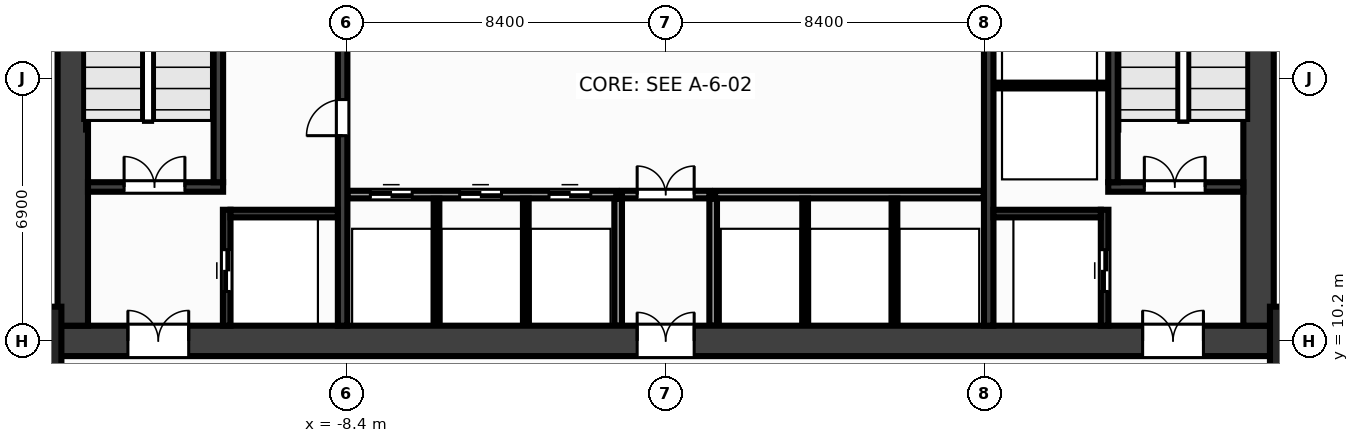
"""IFC4 building model, lengths in metres.
Left out: names, types, materials, properties, quantities, classifications, styles, units other than length and angle.
Written with IfcOpenShell. Run it as: python <this file> out.ifc"""

import sys

from ifc_helpers import new_model, si_unit, direction, frame, frame_2d, origin, origin_2d, place, context, subcontext, project, spatial, rectangle, extrude, source, transform, mapped, element, fill, save


model = new_model("IFC4")
c1 = context("Model", 3, precision=1e-05, world=origin(), true_north=direction((0.0, 1.0)))
c2 = subcontext(c1, "Body", "Model", "MODEL_VIEW")
j1 = project(units=[si_unit("LENGTHUNIT", "METRE"), si_unit("PLANEANGLEUNIT", "RADIAN")], contexts=[c1])
p1 = place(None, origin())
s1 = spatial("IfcSite", under=j1, at=p1, CompositionType="ELEMENT")
p2 = place(p1, origin())
s2 = spatial("IfcBuilding", under=s1, at=p2, CompositionType="ELEMENT")
p3 = place(p2, frame((0.0, 0.0, 18.95)))
s3 = spatial("IfcBuildingStorey", under=s2, at=p3, CompositionType="ELEMENT", Elevation=18.95)
m1 = source(origin(), c2, "Body", "SweptSolid", [
    extrude(rectangle(XDim=32.0, YDim=0.8, at=frame_2d((16.0, 0.0))), origin(), (0.0, 0.0, 1.0), 4.65),
])
p4 = place(p3, frame((-16.0, 10.2, 0.0), z_axis=(0.0, 0.0, 1.0), x_axis=(1.0, 0.0, 0.0)))
e1 = element("IfcWall", 1, at=p4, inside=s3, PredefinedType="SHEAR", context=c2, shape_type="MappedRepresentation", body=[
    mapped(m1, transform((0.0, 0.0, 0.0), x_axis=(1.0, 0.0, 0.0), y_axis=(0.0, 1.0, 0.0), z_axis=(0.0, 0.0, 1.0), scale=1.0)),
])
p5 = place(p4, frame((1.85, 0.0, 0.0)))
e2 = element("IfcOpeningElement", 2, at=p5, cuts=e1, PredefinedType="OPENING", context=c2, shape_type="SweptSolid", body=[
    extrude(rectangle(XDim=1.6, YDim=2.15, at=frame_2d((0.8, 1.075))), frame((0.0, 0.412, 0.0), z_axis=(0.0, -1.0, 0.0), x_axis=(1.0, 0.0, 0.0)), (0.0, 0.0, 1.0), 0.824),
])
p6 = place(p4, frame((28.55, 0.0, 0.0)))
e3 = element("IfcOpeningElement", 3, at=p6, cuts=e1, PredefinedType="OPENING", context=c2, shape_type="SweptSolid", body=[
    extrude(rectangle(XDim=1.6, YDim=2.15, at=frame_2d((0.8, 1.075))), frame((0.0, 0.412, 0.0), z_axis=(0.0, -1.0, 0.0), x_axis=(1.0, 0.0, 0.0)), (0.0, 0.0, 1.0), 0.824),
])
p7 = place(p4, frame((15.25, 0.0, 0.0)))
e4 = element("IfcOpeningElement", 4, at=p7, cuts=e1, PredefinedType="OPENING", context=c2, shape_type="SweptSolid", body=[
    extrude(rectangle(XDim=1.5, YDim=2.2, at=frame_2d((0.75, 1.1))), frame((0.0, 0.412, 0.0), z_axis=(0.0, -1.0, 0.0), x_axis=(1.0, 0.0, 0.0)), (0.0, 0.0, 1.0), 0.824),
])
m2 = source(origin(), c2, "Body", "SweptSolid", [
    extrude(rectangle(XDim=12.8, YDim=0.8, at=frame_2d((6.4, 0.0))), origin(), (0.0, 0.0, 1.0), 4.65),
])
for number, where, z_axis, x_axis in (
    (5, (-15.6, 10.6, 0.0), (0.0, 0.0, 1.0), (0.0, 1.0, 0.0)),
    (6, (15.6, 10.6, 0.0), (0.0, 0.0, 1.0), (0.0, 1.0, 0.0)),
):
    element("IfcWall", number, at=place(p3, frame(where, z_axis=z_axis, x_axis=x_axis)), inside=s3, PredefinedType="SHEAR", context=c2, shape_type="MappedRepresentation", body=[
        mapped(m2, transform((0.0, 0.0, 0.0), x_axis=(1.0, 0.0, 0.0), y_axis=(0.0, 1.0, 0.0), z_axis=(0.0, 0.0, 1.0), scale=1.0)),
    ])
m3 = source(origin(), c2, "Body", "SweptSolid", [
    extrude(rectangle(XDim=12.8, YDim=0.25, at=frame_2d((6.4, 0.0))), origin(), (0.0, 0.0, 1.0), 4.65),
])
p8 = place(p3, frame((-8.5, 10.6, 0.0), z_axis=(0.0, 0.0, 1.0), x_axis=(0.0, 1.0, 0.0)))
e7 = element("IfcWall", 7, at=p8, inside=s3, PredefinedType="SHEAR", context=c2, shape_type="MappedRepresentation", body=[
    mapped(m3, transform((0.0, 0.0, 0.0), x_axis=(1.0, 0.0, 0.0), y_axis=(0.0, 1.0, 0.0), z_axis=(0.0, 0.0, 1.0), scale=1.0)),
])
p9 = place(p8, frame((5.0, 0.0, 0.0)))
e8 = element("IfcOpeningElement", 8, at=p9, cuts=e7, PredefinedType="OPENING", context=c2, shape_type="SweptSolid", body=[
    extrude(rectangle(XDim=0.95, YDim=2.15, at=frame_2d((0.475, 1.075))), frame((0.0, 0.137, 0.0), z_axis=(0.0, -1.0, 0.0), x_axis=(1.0, 0.0, 0.0)), (0.0, 0.0, 1.0), 0.274),
])
p10 = place(p8, frame((8.1, 0.0, 0.0)))
e9 = element("IfcOpeningElement", 9, at=p10, cuts=e7, PredefinedType="OPENING", context=c2, shape_type="SweptSolid", body=[
    extrude(rectangle(XDim=0.95, YDim=2.15, at=frame_2d((0.475, 1.075))), frame((0.0, 0.137, 0.0), z_axis=(0.0, -1.0, 0.0), x_axis=(1.0, 0.0, 0.0)), (0.0, 0.0, 1.0), 0.274),
])
p11 = place(p3, frame((8.5, 10.6, 0.0), z_axis=(0.0, 0.0, 1.0), x_axis=(0.0, 1.0, 0.0)))
e10 = element("IfcWall", 10, at=p11, inside=s3, PredefinedType="SHEAR", context=c2, shape_type="MappedRepresentation", body=[
    mapped(m3, transform((0.0, 0.0, 0.0), x_axis=(1.0, 0.0, 0.0), y_axis=(0.0, 1.0, 0.0), z_axis=(0.0, 0.0, 1.0), scale=1.0)),
])
p12 = place(p11, frame((9.85, 0.0, 0.0)))
e11 = element("IfcOpeningElement", 11, at=p12, cuts=e10, PredefinedType="OPENING", context=c2, shape_type="SweptSolid", body=[
    extrude(rectangle(XDim=0.95, YDim=2.15, at=frame_2d((0.475, 1.075))), frame((0.0, 0.137, 0.0), z_axis=(0.0, -1.0, 0.0), x_axis=(1.0, 0.0, 0.0)), (0.0, 0.0, 1.0), 0.274),
])
m4 = source(origin(), c2, "Body", "SweptSolid", [
    extrude(rectangle(XDim=3.555, YDim=0.25, at=frame_2d((1.777, 0.0))), origin(), (0.0, 0.0, 1.0), 4.65),
])
p13 = place(p3, frame((-15.2, 14.25, 0.0), z_axis=(0.0, 0.0, 1.0), x_axis=(1.0, 0.0, 0.0)))
e12 = element("IfcWall", 12, at=p13, inside=s3, PredefinedType="SHEAR", context=c2, shape_type="MappedRepresentation", body=[
    mapped(m4, transform((0.0, 0.0, 0.0), x_axis=(1.0, 0.0, 0.0), y_axis=(0.0, 1.0, 0.0), z_axis=(0.0, 0.0, 1.0), scale=1.0)),
])
p14 = place(p13, frame((0.95, 0.0, 0.0)))
e13 = element("IfcOpeningElement", 13, at=p14, cuts=e12, PredefinedType="OPENING", context=c2, shape_type="SweptSolid", body=[
    extrude(rectangle(XDim=1.6, YDim=2.15, at=frame_2d((0.8, 1.075))), frame((0.0, 0.137, 0.0), z_axis=(0.0, -1.0, 0.0), x_axis=(1.0, 0.0, 0.0)), (0.0, 0.0, 1.0), 0.274),
])
m5 = source(origin(), c2, "Body", "SweptSolid", [
    extrude(rectangle(XDim=9.025, YDim=0.25, at=frame_2d((4.512, 0.0))), origin(), (0.0, 0.0, 1.0), 4.65),
])
p15 = place(p3, frame((-11.77, 14.375, 0.0), z_axis=(0.0, 0.0, 1.0), x_axis=(0.0, 1.0, 0.0)))
e14 = element("IfcWall", 14, at=p15, inside=s3, PredefinedType="SHEAR", context=c2, shape_type="MappedRepresentation", body=[
    mapped(m5, transform((0.0, 0.0, 0.0), x_axis=(1.0, 0.0, 0.0), y_axis=(0.0, 1.0, 0.0), z_axis=(0.0, 0.0, 1.0), scale=1.0)),
])
p16 = place(p3, frame((11.645, 14.25, 0.0), z_axis=(0.0, 0.0, 1.0), x_axis=(1.0, 0.0, 0.0)))
e15 = element("IfcWall", 15, at=p16, inside=s3, PredefinedType="SHEAR", context=c2, shape_type="MappedRepresentation", body=[
    mapped(m4, transform((0.0, 0.0, 0.0), x_axis=(1.0, 0.0, 0.0), y_axis=(0.0, 1.0, 0.0), z_axis=(0.0, 0.0, 1.0), scale=1.0)),
])
p17 = place(p16, frame((0.95, 0.0, 0.0)))
e16 = element("IfcOpeningElement", 16, at=p17, cuts=e15, PredefinedType="OPENING", context=c2, shape_type="SweptSolid", body=[
    extrude(rectangle(XDim=1.6, YDim=2.15, at=frame_2d((0.8, 1.075))), frame((0.0, 0.137, 0.0), z_axis=(0.0, -1.0, 0.0), x_axis=(1.0, 0.0, 0.0)), (0.0, 0.0, 1.0), 0.274),
])
p18 = place(p3, frame((11.77, 14.375, 0.0), z_axis=(0.0, 0.0, 1.0), x_axis=(0.0, 1.0, 0.0)))
e17 = element("IfcWall", 17, at=p18, inside=s3, PredefinedType="SHEAR", context=c2, shape_type="MappedRepresentation", body=[
    mapped(m5, transform((0.0, 0.0, 0.0), x_axis=(1.0, 0.0, 0.0), y_axis=(0.0, 1.0, 0.0), z_axis=(0.0, 0.0, 1.0), scale=1.0)),
])
m6 = source(origin(), c2, "Body", "SweptSolid", [
    extrude(rectangle(XDim=3.05, YDim=0.2, at=frame_2d((1.525, 0.0))), origin(), (0.0, 0.0, 1.0), 4.65),
])
p19 = place(p3, frame((-11.55, 10.6, 0.0), z_axis=(0.0, 0.0, 1.0), x_axis=(0.0, 1.0, 0.0)))
e18 = element("IfcWall", 18, at=p19, inside=s3, PredefinedType="SHEAR", context=c2, shape_type="MappedRepresentation", body=[
    mapped(m6, transform((0.0, 0.0, 0.0), x_axis=(1.0, 0.0, 0.0), y_axis=(0.0, 1.0, 0.0), z_axis=(0.0, 0.0, 1.0), scale=1.0)),
])
p20 = place(p19, frame((0.9, 0.0, 0.0)))
e19 = element("IfcOpeningElement", 19, at=p20, cuts=e18, PredefinedType="OPENING", context=c2, shape_type="SweptSolid", body=[
    extrude(rectangle(XDim=1.1, YDim=2.15, at=frame_2d((0.55, 1.075))), frame((0.0, 0.112, 0.0), z_axis=(0.0, -1.0, 0.0), x_axis=(1.0, 0.0, 0.0)), (0.0, 0.0, 1.0), 0.224),
])
m7 = source(origin(), c2, "Body", "SweptSolid", [
    extrude(rectangle(XDim=2.825, YDim=0.2, at=frame_2d((1.413, 0.0))), origin(), (0.0, 0.0, 1.0), 4.65),
])
p21 = place(p3, frame((-11.45, 13.55, 0.0), z_axis=(0.0, 0.0, 1.0), x_axis=(1.0, 0.0, 0.0)))
e20 = element("IfcWall", 20, at=p21, inside=s3, PredefinedType="SHEAR", context=c2, shape_type="MappedRepresentation", body=[
    mapped(m7, transform((0.0, 0.0, 0.0), x_axis=(1.0, 0.0, 0.0), y_axis=(0.0, 1.0, 0.0), z_axis=(0.0, 0.0, 1.0), scale=1.0)),
])
p22 = place(p3, frame((11.55, 10.6, 0.0), z_axis=(0.0, 0.0, 1.0), x_axis=(0.0, 1.0, 0.0)))
e21 = element("IfcWall", 21, at=p22, inside=s3, PredefinedType="SHEAR", context=c2, shape_type="MappedRepresentation", body=[
    mapped(m6, transform((0.0, 0.0, 0.0), x_axis=(1.0, 0.0, 0.0), y_axis=(0.0, 1.0, 0.0), z_axis=(0.0, 0.0, 1.0), scale=1.0)),
])
p23 = place(p22, frame((0.9, 0.0, 0.0)))
e22 = element("IfcOpeningElement", 22, at=p23, cuts=e21, PredefinedType="OPENING", context=c2, shape_type="SweptSolid", body=[
    extrude(rectangle(XDim=1.1, YDim=2.15, at=frame_2d((0.55, 1.075))), frame((0.0, 0.112, 0.0), z_axis=(0.0, -1.0, 0.0), x_axis=(1.0, 0.0, 0.0)), (0.0, 0.0, 1.0), 0.224),
])
p24 = place(p3, frame((8.625, 13.55, 0.0), z_axis=(0.0, 0.0, 1.0), x_axis=(1.0, 0.0, 0.0)))
e23 = element("IfcWall", 23, at=p24, inside=s3, PredefinedType="SHEAR", context=c2, shape_type="MappedRepresentation", body=[
    mapped(m7, transform((0.0, 0.0, 0.0), x_axis=(1.0, 0.0, 0.0), y_axis=(0.0, 1.0, 0.0), z_axis=(0.0, 0.0, 1.0), scale=1.0)),
])
m8 = source(origin(), c2, "Body", "SweptSolid", [
    extrude(rectangle(XDim=1.8, YDim=1.8, at=origin_2d()), origin(), (0.0, 0.0, 1.0), 4.65),
])
for number, where, z_axis, x_axis in (
    (24, (-16.8, 10.2, 0.0), (0.0, 0.0, 1.0), (1.0, 0.0, 0.0)),
    (25, (16.8, 10.2, 0.0), (0.0, 0.0, 1.0), (1.0, 0.0, 0.0)),
):
    element("IfcColumn", number, at=place(p3, frame(where, z_axis=z_axis, x_axis=x_axis)), inside=s3, PredefinedType="COLUMN", context=c2, shape_type="MappedRepresentation", body=[
        mapped(m8, transform((0.0, 0.0, 0.0), x_axis=(1.0, 0.0, 0.0), y_axis=(0.0, 1.0, 0.0), z_axis=(0.0, 0.0, 1.0), scale=1.0)),
    ])
m9 = source(origin(), c2, "Body", "SweptSolid", [
    extrude(rectangle(XDim=3.01, YDim=0.15, at=frame_2d((1.505, 0.0))), origin(), (0.0, 0.0, 1.0), 4.41),
])
p25 = place(p3, frame((8.63, 16.92, 0.0), z_axis=(0.0, 0.0, 1.0), x_axis=(1.0, 0.0, 0.0)))
e26 = element("IfcWall", 26, at=p25, inside=s3, PredefinedType="PARTITIONING", context=c2, shape_type="MappedRepresentation", body=[
    mapped(m9, transform((0.0, 0.0, 0.0), x_axis=(1.0, 0.0, 0.0), y_axis=(0.0, 1.0, 0.0), z_axis=(0.0, 0.0, 1.0), scale=1.0)),
])
m10 = source(origin(), c2, "Body", "SweptSolid", [
    extrude(rectangle(XDim=7.07, YDim=0.2, at=frame_2d((3.535, 0.0))), origin(), (0.0, 0.0, 1.0), 4.41),
])
p26 = place(p3, frame((-8.37, 14.05, 0.0), z_axis=(0.0, 0.0, 1.0), x_axis=(1.0, 0.0, 0.0)))
e27 = element("IfcWall", 27, at=p26, inside=s3, PredefinedType="PARTITIONING", context=c2, shape_type="MappedRepresentation", body=[
    mapped(m10, transform((0.0, 0.0, 0.0), x_axis=(1.0, 0.0, 0.0), y_axis=(0.0, 1.0, 0.0), z_axis=(0.0, 0.0, 1.0), scale=1.0)),
])
p27 = place(p26, frame((0.6, 0.0, 0.0)))
e28 = element("IfcOpeningElement", 28, at=p27, cuts=e27, PredefinedType="OPENING", context=c2, shape_type="SweptSolid", body=[
    extrude(rectangle(XDim=1.1, YDim=2.15, at=frame_2d((0.55, 1.075))), frame((0.0, 0.112, 0.0), z_axis=(0.0, -1.0, 0.0), x_axis=(1.0, 0.0, 0.0)), (0.0, 0.0, 1.0), 0.224),
])
p28 = place(p26, frame((2.95, 0.0, 0.0)))
e29 = element("IfcOpeningElement", 29, at=p28, cuts=e27, PredefinedType="OPENING", context=c2, shape_type="SweptSolid", body=[
    extrude(rectangle(XDim=1.1, YDim=2.15, at=frame_2d((0.55, 1.075))), frame((0.0, 0.112, 0.0), z_axis=(0.0, -1.0, 0.0), x_axis=(1.0, 0.0, 0.0)), (0.0, 0.0, 1.0), 0.224),
])
p29 = place(p26, frame((5.3, 0.0, 0.0)))
e30 = element("IfcOpeningElement", 30, at=p29, cuts=e27, PredefinedType="OPENING", context=c2, shape_type="SweptSolid", body=[
    extrude(rectangle(XDim=1.1, YDim=2.15, at=frame_2d((0.55, 1.075))), frame((0.0, 0.112, 0.0), z_axis=(0.0, -1.0, 0.0), x_axis=(1.0, 0.0, 0.0)), (0.0, 0.0, 1.0), 0.224),
])
p30 = place(p3, frame((1.3, 14.05, 0.0), z_axis=(0.0, 0.0, 1.0), x_axis=(1.0, 0.0, 0.0)))
e31 = element("IfcWall", 31, at=p30, inside=s3, PredefinedType="PARTITIONING", context=c2, shape_type="MappedRepresentation", body=[
    mapped(m10, transform((0.0, 0.0, 0.0), x_axis=(1.0, 0.0, 0.0), y_axis=(0.0, 1.0, 0.0), z_axis=(0.0, 0.0, 1.0), scale=1.0)),
])
m11 = source(origin(), c2, "Body", "SweptSolid", [
    extrude(rectangle(XDim=3.34, YDim=0.2, at=frame_2d((1.67, 0.0))), origin(), (0.0, 0.0, 1.0), 4.41),
])
for number, where, z_axis, x_axis in (
    (32, (-1.25, 10.6, 0.0), (0.0, 0.0, 1.0), (0.0, 1.0, 0.0)),
    (33, (1.25, 10.6, 0.0), (0.0, 0.0, 1.0), (0.0, 1.0, 0.0)),
):
    element("IfcWall", number, at=place(p3, frame(where, z_axis=z_axis, x_axis=x_axis)), inside=s3, PredefinedType="PARTITIONING", context=c2, shape_type="MappedRepresentation", body=[
        mapped(m11, transform((0.0, 0.0, 0.0), x_axis=(1.0, 0.0, 0.0), y_axis=(0.0, 1.0, 0.0), z_axis=(0.0, 0.0, 1.0), scale=1.0)),
    ])
m12 = source(origin(), c2, "Body", "SweptSolid", [
    extrude(rectangle(XDim=2.3, YDim=0.2, at=frame_2d((1.15, 0.0))), origin(), (0.0, 0.0, 1.0), 4.41),
])
p31 = place(p3, frame((-1.15, 14.05, 0.0), z_axis=(0.0, 0.0, 1.0), x_axis=(1.0, 0.0, 0.0)))
e34 = element("IfcWall", 34, at=p31, inside=s3, PredefinedType="PARTITIONING", context=c2, shape_type="MappedRepresentation", body=[
    mapped(m12, transform((0.0, 0.0, 0.0), x_axis=(1.0, 0.0, 0.0), y_axis=(0.0, 1.0, 0.0), z_axis=(0.0, 0.0, 1.0), scale=1.0)),
])
p32 = place(p31, frame((0.4, 0.0, 0.0)))
e35 = element("IfcOpeningElement", 35, at=p32, cuts=e34, PredefinedType="OPENING", context=c2, shape_type="SweptSolid", body=[
    extrude(rectangle(XDim=1.5, YDim=2.2, at=frame_2d((0.75, 1.1))), frame((0.0, 0.112, 0.0), z_axis=(0.0, -1.0, 0.0), x_axis=(1.0, 0.0, 0.0)), (0.0, 0.0, 1.0), 0.224),
])
m13 = source(origin(), c2, "Body", "SweptSolid", [
    extrude(rectangle(XDim=3.34, YDim=0.15, at=frame_2d((1.67, 0.0))), origin(), (0.0, 0.0, 1.0), 4.41),
])
for number, where, z_axis, x_axis in (
    (36, (-6.03, 10.6, 0.0), (0.0, 0.0, 1.0), (0.0, 1.0, 0.0)),
    (37, (-3.68, 10.6, 0.0), (0.0, 0.0, 1.0), (0.0, 1.0, 0.0)),
    (38, (3.67, 10.6, 0.0), (0.0, 0.0, 1.0), (0.0, 1.0, 0.0)),
    (39, (6.02, 10.6, 0.0), (0.0, 0.0, 1.0), (0.0, 1.0, 0.0)),
):
    element("IfcWall", number, at=place(p3, frame(where, z_axis=z_axis, x_axis=x_axis)), inside=s3, PredefinedType="PARTITIONING", context=c2, shape_type="MappedRepresentation", body=[
        mapped(m13, transform((0.0, 0.0, 0.0), x_axis=(1.0, 0.0, 0.0), y_axis=(0.0, 1.0, 0.0), z_axis=(0.0, 0.0, 1.0), scale=1.0)),
    ])
m14 = source(origin(), c2, "Body", "SweptSolid", [
    extrude(rectangle(XDim=1.6, YDim=2.15, at=frame_2d((0.8, 1.075))), frame((0.0, 0.025, 0.0), z_axis=(0.0, -1.0, 0.0), x_axis=(1.0, 0.0, 0.0)), (0.0, 0.0, 1.0), 0.05),
])
p33 = place(p14, origin())
e40 = element("IfcDoor", 40, at=p33, inside=s3, OperationType="DOUBLE_DOOR_SINGLE_SWING", PredefinedType="DOOR", context=c2, shape_type="MappedRepresentation", body=[
    mapped(m14, transform((0.0, 0.0, 0.0), x_axis=(1.0, 0.0, 0.0), y_axis=(0.0, 1.0, 0.0), z_axis=(0.0, 0.0, 1.0), scale=1.0)),
])
fill(e13, e40)
p34 = place(p17, origin())
e41 = element("IfcDoor", 41, at=p34, inside=s3, OperationType="DOUBLE_DOOR_SINGLE_SWING", PredefinedType="DOOR", context=c2, shape_type="MappedRepresentation", body=[
    mapped(m14, transform((0.0, 0.0, 0.0), x_axis=(1.0, 0.0, 0.0), y_axis=(0.0, 1.0, 0.0), z_axis=(0.0, 0.0, 1.0), scale=1.0)),
])
fill(e16, e41)
p35 = place(p5, origin())
e42 = element("IfcDoor", 42, at=p35, inside=s3, OperationType="DOUBLE_DOOR_SINGLE_SWING", PredefinedType="DOOR", context=c2, shape_type="MappedRepresentation", body=[
    mapped(m14, transform((0.0, 0.0, 0.0), x_axis=(1.0, 0.0, 0.0), y_axis=(0.0, 1.0, 0.0), z_axis=(0.0, 0.0, 1.0), scale=1.0)),
])
fill(e2, e42)
p36 = place(p6, origin())
e43 = element("IfcDoor", 43, at=p36, inside=s3, OperationType="DOUBLE_DOOR_SINGLE_SWING", PredefinedType="DOOR", context=c2, shape_type="MappedRepresentation", body=[
    mapped(m14, transform((0.0, 0.0, 0.0), x_axis=(1.0, 0.0, 0.0), y_axis=(0.0, 1.0, 0.0), z_axis=(0.0, 0.0, 1.0), scale=1.0)),
])
fill(e3, e43)
m15 = source(origin(), c2, "Body", "SweptSolid", [
    extrude(rectangle(XDim=1.1, YDim=2.15, at=frame_2d((0.55, 1.075))), frame((0.0, 0.025, 0.0), z_axis=(0.0, -1.0, 0.0), x_axis=(1.0, 0.0, 0.0)), (0.0, 0.0, 1.0), 0.05),
])
p37 = place(p20, origin())
e44 = element("IfcDoor", 44, at=p37, inside=s3, OperationType="DOUBLE_DOOR_SLIDING", PredefinedType="DOOR", context=c2, shape_type="MappedRepresentation", body=[
    mapped(m15, transform((0.0, 0.0, 0.0), x_axis=(1.0, 0.0, 0.0), y_axis=(0.0, 1.0, 0.0), z_axis=(0.0, 0.0, 1.0), scale=1.0)),
])
fill(e19, e44)
p38 = place(p23, origin())
e45 = element("IfcDoor", 45, at=p38, inside=s3, OperationType="DOUBLE_DOOR_SLIDING", PredefinedType="DOOR", context=c2, shape_type="MappedRepresentation", body=[
    mapped(m15, transform((0.0, 0.0, 0.0), x_axis=(1.0, 0.0, 0.0), y_axis=(0.0, 1.0, 0.0), z_axis=(0.0, 0.0, 1.0), scale=1.0)),
])
fill(e22, e45)
m16 = source(origin(), c2, "Body", "SweptSolid", [
    extrude(rectangle(XDim=0.95, YDim=2.15, at=frame_2d((0.475, 1.075))), frame((0.0, 0.025, 0.0), z_axis=(0.0, -1.0, 0.0), x_axis=(1.0, 0.0, 0.0)), (0.0, 0.0, 1.0), 0.05),
])
p39 = place(p9, origin())
e46 = element("IfcDoor", 46, at=p39, inside=s3, OperationType="SINGLE_SWING_LEFT", PredefinedType="DOOR", context=c2, shape_type="MappedRepresentation", body=[
    mapped(m16, transform((0.0, 0.0, 0.0), x_axis=(1.0, 0.0, 0.0), y_axis=(0.0, 1.0, 0.0), z_axis=(0.0, 0.0, 1.0), scale=1.0)),
])
fill(e8, e46)
p40 = place(p27, origin())
e47 = element("IfcDoor", 47, at=p40, inside=s3, OperationType="DOUBLE_DOOR_SLIDING", PredefinedType="DOOR", context=c2, shape_type="MappedRepresentation", body=[
    mapped(m15, transform((0.0, 0.0, 0.0), x_axis=(1.0, 0.0, 0.0), y_axis=(0.0, 1.0, 0.0), z_axis=(0.0, 0.0, 1.0), scale=1.0)),
])
fill(e28, e47)
p41 = place(p28, origin())
e48 = element("IfcDoor", 48, at=p41, inside=s3, OperationType="DOUBLE_DOOR_SLIDING", PredefinedType="DOOR", context=c2, shape_type="MappedRepresentation", body=[
    mapped(m15, transform((0.0, 0.0, 0.0), x_axis=(1.0, 0.0, 0.0), y_axis=(0.0, 1.0, 0.0), z_axis=(0.0, 0.0, 1.0), scale=1.0)),
])
fill(e29, e48)
p42 = place(p29, origin())
e49 = element("IfcDoor", 49, at=p42, inside=s3, OperationType="DOUBLE_DOOR_SLIDING", PredefinedType="DOOR", context=c2, shape_type="MappedRepresentation", body=[
    mapped(m15, transform((0.0, 0.0, 0.0), x_axis=(1.0, 0.0, 0.0), y_axis=(0.0, 1.0, 0.0), z_axis=(0.0, 0.0, 1.0), scale=1.0)),
])
fill(e30, e49)
m17 = source(origin(), c2, "Body", "SweptSolid", [
    extrude(rectangle(XDim=1.5, YDim=2.2, at=frame_2d((0.75, 1.1))), frame((0.0, 0.025, 0.0), z_axis=(0.0, -1.0, 0.0), x_axis=(1.0, 0.0, 0.0)), (0.0, 0.0, 1.0), 0.05),
])
p43 = place(p32, origin())
e50 = element("IfcDoor", 50, at=p43, inside=s3, OperationType="DOUBLE_DOOR_SINGLE_SWING", PredefinedType="DOOR", context=c2, shape_type="MappedRepresentation", body=[
    mapped(m17, transform((0.0, 0.0, 0.0), x_axis=(1.0, 0.0, 0.0), y_axis=(0.0, 1.0, 0.0), z_axis=(0.0, 0.0, 1.0), scale=1.0)),
])
fill(e35, e50)
p44 = place(p7, origin())
e51 = element("IfcDoor", 51, at=p44, inside=s3, OperationType="DOUBLE_DOOR_SINGLE_SWING", PredefinedType="DOOR", context=c2, shape_type="MappedRepresentation", body=[
    mapped(m17, transform((0.0, 0.0, 0.0), x_axis=(1.0, 0.0, 0.0), y_axis=(0.0, 1.0, 0.0), z_axis=(0.0, 0.0, 1.0), scale=1.0)),
])
fill(e4, e51)
save(model, sys.argv[1])
